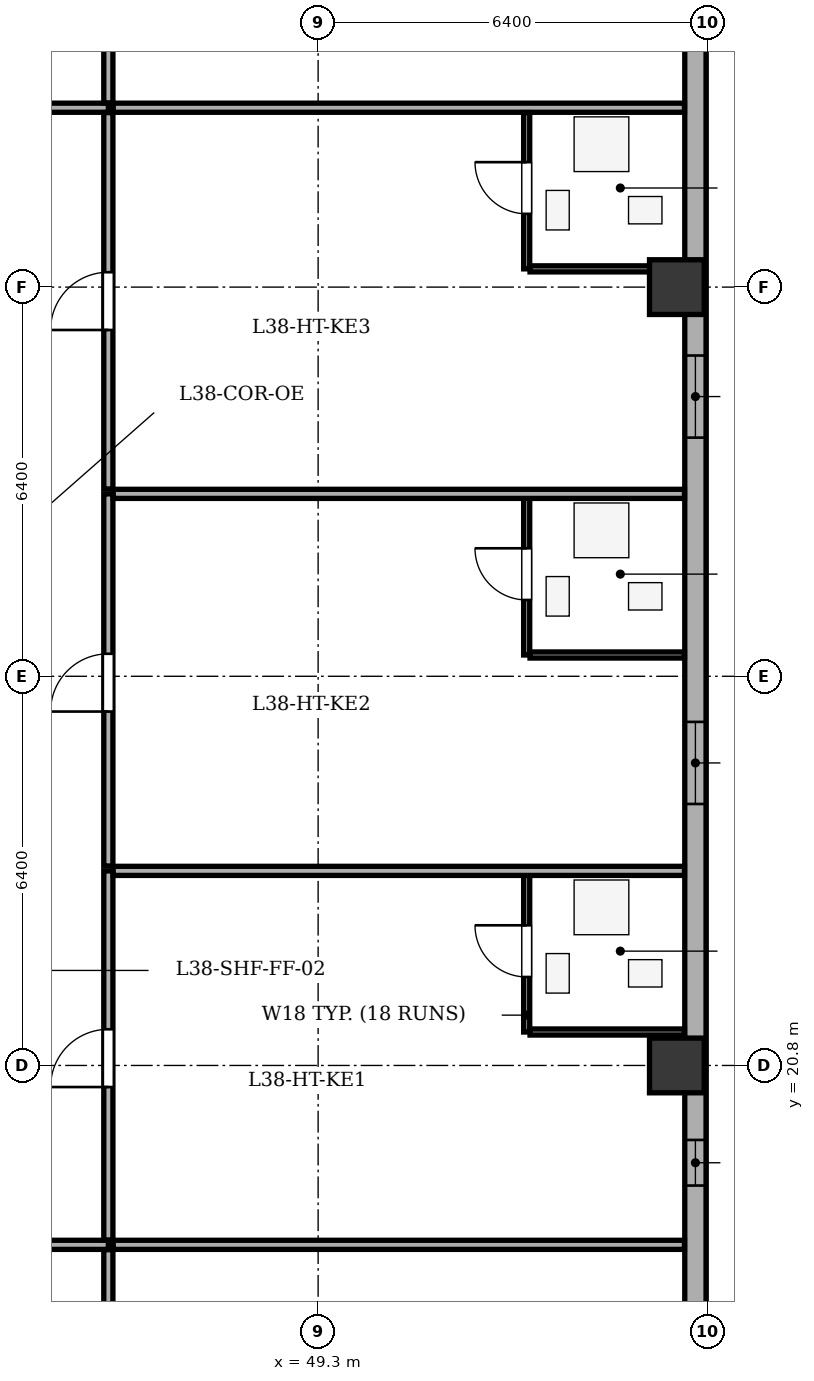
"""IFC4 building model, lengths in metres.
Left out: names, types, materials, properties, quantities, classifications, styles, units other than length and angle.
Written with IfcOpenShell. Run it as: python <this file> out.ifc"""

import sys

from ifc_helpers import new_model, si_unit, direction, frame, frame_2d, origin, origin_2d, place, context, subcontext, project, spatial, rectangle, extrude, element, fill, save


model = new_model("IFC4")
c1 = context("Model", 3, precision=1e-05, world=origin(), true_north=direction((0.0, 1.0)))
c2 = subcontext(c1, "Body", "Model", "MODEL_VIEW")
j1 = project(units=[si_unit("LENGTHUNIT", "METRE"), si_unit("PLANEANGLEUNIT", "RADIAN")], contexts=[c1])
p1 = place(None, origin())
s1 = spatial("IfcSite", under=j1, at=p1, CompositionType="ELEMENT")
p2 = place(p1, origin())
s2 = spatial("IfcBuilding", under=s1, at=p2, CompositionType="ELEMENT")
p3 = place(p2, frame((0.0, 0.0, 151.8)))
s3 = spatial("IfcBuildingStorey", under=s2, at=p3, CompositionType="ELEMENT", Elevation=151.8)
for number, where, z_axis, x_axis in (
    (1, (55.2, 20.8, 0.0), (0.0, 0.0, 1.0), (1.0, 0.0, 0.0)),
    (2, (55.2, 33.6, 0.0), (0.0, 0.0, 1.0), (1.0, 0.0, 0.0)),
):
    element("IfcColumn", number, at=place(p3, frame(where, z_axis=z_axis, x_axis=x_axis)), inside=s3, PredefinedType="COLUMN", context=c2, shape_type="SweptSolid", body=[
        extrude(rectangle(XDim=0.9, YDim=0.9, at=origin_2d()), origin(), (0.0, 0.0, 1.0), 3.5),
    ])
p4 = place(p3, frame((55.505, 41.5, 0.0), z_axis=(0.0, 0.0, 1.0), x_axis=(0.0, -1.0, 0.0)))
e3 = element("IfcWall", 3, at=p4, inside=s3, PredefinedType="STANDARD", context=c2, shape_type="SweptSolid", body=[
    extrude(rectangle(XDim=35.0, YDim=0.35, at=frame_2d((17.5, 0.0))), origin(), (0.0, 0.0, 1.0), 2.785),
])
p5 = place(p4, frame((1.813, 0.0, 0.75)))
e4 = element("IfcOpeningElement", 4, at=p5, cuts=e3, PredefinedType="OPENING", context=c2, shape_type="SweptSolid", body=[
    extrude(rectangle(XDim=1.6, YDim=1.75, at=frame_2d((0.8, 0.875))), frame((0.0, 0.185, 0.0), z_axis=(0.0, -1.0, 0.0), x_axis=(1.0, 0.0, 0.0)), (0.0, 0.0, 1.0), 0.37),
])
p6 = place(p4, frame((9.025, 0.0, 0.75)))
e5 = element("IfcOpeningElement", 5, at=p6, cuts=e3, PredefinedType="OPENING", context=c2, shape_type="SweptSolid", body=[
    extrude(rectangle(XDim=1.35, YDim=1.75, at=frame_2d((0.675, 0.875))), frame((0.0, 0.185, 0.0), z_axis=(0.0, -1.0, 0.0), x_axis=(1.0, 0.0, 0.0)), (0.0, 0.0, 1.0), 0.37),
])
p7 = place(p4, frame((15.05, 0.0, 0.75)))
e6 = element("IfcOpeningElement", 6, at=p7, cuts=e3, PredefinedType="OPENING", context=c2, shape_type="SweptSolid", body=[
    extrude(rectangle(XDim=1.35, YDim=1.75, at=frame_2d((0.675, 0.875))), frame((0.0, 0.185, 0.0), z_axis=(0.0, -1.0, 0.0), x_axis=(1.0, 0.0, 0.0)), (0.0, 0.0, 1.0), 0.37),
])
p8 = place(p4, frame((25.97, 0.0, 0.75)))
e7 = element("IfcOpeningElement", 7, at=p8, cuts=e3, PredefinedType="OPENING", context=c2, shape_type="SweptSolid", body=[
    extrude(rectangle(XDim=1.6, YDim=1.75, at=frame_2d((0.8, 0.875))), frame((0.0, 0.185, 0.0), z_axis=(0.0, -1.0, 0.0), x_axis=(1.0, 0.0, 0.0)), (0.0, 0.0, 1.0), 0.37),
])
p9 = place(p4, frame((30.555, 0.0, 0.75)))
e8 = element("IfcOpeningElement", 8, at=p9, cuts=e3, PredefinedType="OPENING", context=c2, shape_type="SweptSolid", body=[
    extrude(rectangle(XDim=2.1, YDim=1.75, at=frame_2d((1.05, 0.875))), frame((0.0, 0.185, 0.0), z_axis=(0.0, -1.0, 0.0), x_axis=(1.0, 0.0, 0.0)), (0.0, 0.0, 1.0), 0.37),
])
p10 = place(p4, frame((21.925, 0.0, 0.75)))
e9 = element("IfcOpeningElement", 9, at=p10, cuts=e3, PredefinedType="OPENING", context=c2, shape_type="SweptSolid", body=[
    extrude(rectangle(XDim=0.75, YDim=1.45, at=frame_2d((0.375, 0.725))), frame((0.0, 0.185, 0.0), z_axis=(0.0, -1.0, 0.0), x_axis=(1.0, 0.0, 0.0)), (0.0, 0.0, 1.0), 0.37),
])
p11 = place(p3, frame((42.073, 17.85, 0.0), z_axis=(0.0, 0.0, 1.0), x_axis=(1.0, 0.0, 0.0)))
e10 = element("IfcWall", 10, at=p11, inside=s3, PredefinedType="PARTITIONING", context=c2, shape_type="SweptSolid", body=[
    extrude(rectangle(XDim=3.777, YDim=0.15, at=frame_2d((1.889, 0.0))), origin(), (0.0, 0.0, 1.0), 3.2),
])
p12 = place(p11, frame((1.409, 0.0, 0.0)))
e11 = element("IfcOpeningElement", 11, at=p12, cuts=e10, PredefinedType="OPENING", context=c2, shape_type="SweptSolid", body=[
    extrude(rectangle(XDim=0.95, YDim=2.1, at=frame_2d((0.475, 1.05))), frame((0.0, 0.085, 0.0), z_axis=(0.0, -1.0, 0.0), x_axis=(1.0, 0.0, 0.0)), (0.0, 0.0, 1.0), 0.17),
])
p13 = place(p3, frame((45.85, 1.875, 0.0), z_axis=(0.0, 0.0, 1.0), x_axis=(0.0, 1.0, 0.0)))
e12 = element("IfcWall", 12, at=p13, inside=s3, PredefinedType="PARTITIONING", context=c2, shape_type="SweptSolid", body=[
    extrude(rectangle(XDim=15.895, YDim=0.15, at=frame_2d((7.948, 0.0))), origin(), (0.0, 0.0, 1.0), 3.2),
])
p14 = place(p3, frame((32.664, 36.55, 0.0), z_axis=(0.0, 0.0, 1.0), x_axis=(1.0, 0.0, 0.0)))
e13 = element("IfcWall", 13, at=p14, inside=s3, PredefinedType="PARTITIONING", context=c2, shape_type="SweptSolid", body=[
    extrude(rectangle(XDim=13.186, YDim=0.15, at=frame_2d((6.593, 0.0))), origin(), (0.0, 0.0, 1.0), 3.2),
])
p15 = place(p14, frame((6.033, 0.0, 0.0)))
e14 = element("IfcOpeningElement", 14, at=p15, cuts=e13, PredefinedType="OPENING", context=c2, shape_type="SweptSolid", body=[
    extrude(rectangle(XDim=1.0, YDim=2.1, at=frame_2d((0.5, 1.05))), frame((0.0, 0.085, 0.0), z_axis=(0.0, -1.0, 0.0), x_axis=(1.0, 0.0, 0.0)), (0.0, 0.0, 1.0), 0.17),
])
p16 = place(p3, frame((45.85, 36.63, 0.0), z_axis=(0.0, 0.0, 1.0), x_axis=(0.0, 1.0, 0.0)))
e15 = element("IfcWall", 15, at=p16, inside=s3, PredefinedType="PARTITIONING", context=c2, shape_type="SweptSolid", body=[
    extrude(rectangle(XDim=9.495, YDim=0.15, at=frame_2d((4.748, 0.0))), origin(), (0.0, 0.0, 1.0), 3.2),
])
for number, where, z_axis, x_axis in (
    (16, (45.93, 17.85, 0.0), (0.0, 0.0, 1.0), (1.0, 0.0, 0.0)),
    (17, (45.93, 36.55, 0.0), (0.0, 0.0, 1.0), (1.0, 0.0, 0.0)),
):
    element("IfcWall", number, at=place(p3, frame(where, z_axis=z_axis, x_axis=x_axis)), inside=s3, PredefinedType="PARTITIONING", context=c2, shape_type="SweptSolid", body=[
        extrude(rectangle(XDim=9.395, YDim=0.15, at=frame_2d((4.698, 0.0))), origin(), (0.0, 0.0, 1.0), 3.2),
    ])
p17 = place(p3, frame((45.85, 17.93, 0.0), z_axis=(0.0, 0.0, 1.0), x_axis=(0.0, 1.0, 0.0)))
e18 = element("IfcWall", 18, at=p17, inside=s3, PredefinedType="PARTITIONING", context=c2, shape_type="SweptSolid", body=[
    extrude(rectangle(XDim=6.07, YDim=0.15, at=frame_2d((3.035, 0.0))), origin(), (0.0, 0.0, 1.0), 3.2),
])
p18 = place(p17, frame((2.515, 0.0, 0.0)))
e19 = element("IfcOpeningElement", 19, at=p18, cuts=e18, PredefinedType="OPENING", context=c2, shape_type="SweptSolid", body=[
    extrude(rectangle(XDim=0.95, YDim=2.1, at=frame_2d((0.475, 1.05))), frame((0.0, 0.085, 0.0), z_axis=(0.0, -1.0, 0.0), x_axis=(1.0, 0.0, 0.0)), (0.0, 0.0, 1.0), 0.17),
])
p19 = place(p3, frame((52.73, 21.35, 0.0), z_axis=(0.0, 0.0, 1.0), x_axis=(0.0, 1.0, 0.0)))
e20 = element("IfcWall", 20, at=p19, inside=s3, PredefinedType="PARTITIONING", context=c2, shape_type="SweptSolid", body=[
    extrude(rectangle(XDim=2.65, YDim=0.1, at=frame_2d((1.325, 0.0))), origin(), (0.0, 0.0, 1.0), 3.2),
])
p20 = place(p19, frame((0.905, 0.0, 0.0)))
e21 = element("IfcOpeningElement", 21, at=p20, cuts=e20, PredefinedType="OPENING", context=c2, shape_type="SweptSolid", body=[
    extrude(rectangle(XDim=0.85, YDim=2.05, at=frame_2d((0.425, 1.025))), frame((0.0, 0.06, 0.0), z_axis=(0.0, -1.0, 0.0), x_axis=(1.0, 0.0, 0.0)), (0.0, 0.0, 1.0), 0.12),
])
p21 = place(p3, frame((52.785, 21.35, 0.0), z_axis=(0.0, 0.0, 1.0), x_axis=(1.0, 0.0, 0.0)))
e22 = element("IfcWall", 22, at=p21, inside=s3, PredefinedType="PARTITIONING", context=c2, shape_type="SweptSolid", body=[
    extrude(rectangle(XDim=2.54, YDim=0.1, at=frame_2d((1.27, 0.0))), origin(), (0.0, 0.0, 1.0), 3.2),
])
p22 = place(p3, frame((45.93, 24.0, 0.0), z_axis=(0.0, 0.0, 1.0), x_axis=(1.0, 0.0, 0.0)))
e23 = element("IfcWall", 23, at=p22, inside=s3, PredefinedType="PARTITIONING", context=c2, shape_type="SweptSolid", body=[
    extrude(rectangle(XDim=9.395, YDim=0.15, at=frame_2d((4.698, 0.0))), origin(), (0.0, 0.0, 1.0), 3.2),
])
p23 = place(p3, frame((45.85, 24.08, 0.0), z_axis=(0.0, 0.0, 1.0), x_axis=(0.0, 1.0, 0.0)))
e24 = element("IfcWall", 24, at=p23, inside=s3, PredefinedType="PARTITIONING", context=c2, shape_type="SweptSolid", body=[
    extrude(rectangle(XDim=6.12, YDim=0.15, at=frame_2d((3.06, 0.0))), origin(), (0.0, 0.0, 1.0), 3.2),
])
p24 = place(p23, frame((2.54, 0.0, 0.0)))
e25 = element("IfcOpeningElement", 25, at=p24, cuts=e24, PredefinedType="OPENING", context=c2, shape_type="SweptSolid", body=[
    extrude(rectangle(XDim=0.95, YDim=2.1, at=frame_2d((0.475, 1.05))), frame((0.0, 0.085, 0.0), z_axis=(0.0, -1.0, 0.0), x_axis=(1.0, 0.0, 0.0)), (0.0, 0.0, 1.0), 0.17),
])
p25 = place(p3, frame((52.73, 27.55, 0.0), z_axis=(0.0, 0.0, 1.0), x_axis=(0.0, 1.0, 0.0)))
e26 = element("IfcWall", 26, at=p25, inside=s3, PredefinedType="PARTITIONING", context=c2, shape_type="SweptSolid", body=[
    extrude(rectangle(XDim=2.65, YDim=0.1, at=frame_2d((1.325, 0.0))), origin(), (0.0, 0.0, 1.0), 3.2),
])
p26 = place(p25, frame((0.905, 0.0, 0.0)))
e27 = element("IfcOpeningElement", 27, at=p26, cuts=e26, PredefinedType="OPENING", context=c2, shape_type="SweptSolid", body=[
    extrude(rectangle(XDim=0.85, YDim=2.05, at=frame_2d((0.425, 1.025))), frame((0.0, 0.06, 0.0), z_axis=(0.0, -1.0, 0.0), x_axis=(1.0, 0.0, 0.0)), (0.0, 0.0, 1.0), 0.12),
])
p27 = place(p3, frame((52.785, 27.55, 0.0), z_axis=(0.0, 0.0, 1.0), x_axis=(1.0, 0.0, 0.0)))
e28 = element("IfcWall", 28, at=p27, inside=s3, PredefinedType="PARTITIONING", context=c2, shape_type="SweptSolid", body=[
    extrude(rectangle(XDim=2.54, YDim=0.1, at=frame_2d((1.27, 0.0))), origin(), (0.0, 0.0, 1.0), 3.2),
])
p28 = place(p3, frame((45.93, 30.2, 0.0), z_axis=(0.0, 0.0, 1.0), x_axis=(1.0, 0.0, 0.0)))
e29 = element("IfcWall", 29, at=p28, inside=s3, PredefinedType="PARTITIONING", context=c2, shape_type="SweptSolid", body=[
    extrude(rectangle(XDim=9.395, YDim=0.15, at=frame_2d((4.698, 0.0))), origin(), (0.0, 0.0, 1.0), 3.2),
])
p29 = place(p3, frame((45.85, 30.28, 0.0), z_axis=(0.0, 0.0, 1.0), x_axis=(0.0, 1.0, 0.0)))
e30 = element("IfcWall", 30, at=p29, inside=s3, PredefinedType="PARTITIONING", context=c2, shape_type="SweptSolid", body=[
    extrude(rectangle(XDim=6.19, YDim=0.15, at=frame_2d((3.095, 0.0))), origin(), (0.0, 0.0, 1.0), 3.2),
])
p30 = place(p29, frame((2.615, 0.0, 0.0)))
e31 = element("IfcOpeningElement", 31, at=p30, cuts=e30, PredefinedType="OPENING", context=c2, shape_type="SweptSolid", body=[
    extrude(rectangle(XDim=0.95, YDim=2.1, at=frame_2d((0.475, 1.05))), frame((0.0, 0.085, 0.0), z_axis=(0.0, -1.0, 0.0), x_axis=(1.0, 0.0, 0.0)), (0.0, 0.0, 1.0), 0.17),
])
p31 = place(p3, frame((52.73, 33.9, 0.0), z_axis=(0.0, 0.0, 1.0), x_axis=(0.0, 1.0, 0.0)))
e32 = element("IfcWall", 32, at=p31, inside=s3, PredefinedType="PARTITIONING", context=c2, shape_type="SweptSolid", body=[
    extrude(rectangle(XDim=2.57, YDim=0.1, at=frame_2d((1.285, 0.0))), origin(), (0.0, 0.0, 1.0), 3.2),
])
p32 = place(p31, frame((0.905, 0.0, 0.0)))
e33 = element("IfcOpeningElement", 33, at=p32, cuts=e32, PredefinedType="OPENING", context=c2, shape_type="SweptSolid", body=[
    extrude(rectangle(XDim=0.85, YDim=2.05, at=frame_2d((0.425, 1.025))), frame((0.0, 0.06, 0.0), z_axis=(0.0, -1.0, 0.0), x_axis=(1.0, 0.0, 0.0)), (0.0, 0.0, 1.0), 0.12),
])
p33 = place(p3, frame((52.785, 33.9, 0.0), z_axis=(0.0, 0.0, 1.0), x_axis=(1.0, 0.0, 0.0)))
e34 = element("IfcWall", 34, at=p33, inside=s3, PredefinedType="PARTITIONING", context=c2, shape_type="SweptSolid", body=[
    extrude(rectangle(XDim=2.54, YDim=0.1, at=frame_2d((1.27, 0.0))), origin(), (0.0, 0.0, 1.0), 2.535),
])
p34 = place(p6, origin())
e35 = element("IfcWindow", 35, at=p34, inside=s3, PartitioningType="SINGLE_PANEL", PredefinedType="WINDOW", context=c2, shape_type="SweptSolid", body=[
    extrude(rectangle(XDim=1.35, YDim=1.75, at=frame_2d((0.675, 0.875))), frame((0.0, -0.01, 0.0), z_axis=(0.0, -1.0, 0.0), x_axis=(1.0, 0.0, 0.0)), (0.0, 0.0, 1.0), 0.06),
])
fill(e5, e35)
p35 = place(p7, origin())
e36 = element("IfcWindow", 36, at=p35, inside=s3, PartitioningType="SINGLE_PANEL", PredefinedType="WINDOW", context=c2, shape_type="SweptSolid", body=[
    extrude(rectangle(XDim=1.35, YDim=1.75, at=frame_2d((0.675, 0.875))), frame((0.0, -0.01, 0.0), z_axis=(0.0, -1.0, 0.0), x_axis=(1.0, 0.0, 0.0)), (0.0, 0.0, 1.0), 0.06),
])
fill(e6, e36)
p36 = place(p10, origin())
e37 = element("IfcWindow", 37, at=p36, inside=s3, PartitioningType="SINGLE_PANEL", PredefinedType="WINDOW", context=c2, shape_type="SweptSolid", body=[
    extrude(rectangle(XDim=0.75, YDim=1.45, at=frame_2d((0.375, 0.725))), frame((0.0, -0.01, 0.0), z_axis=(0.0, -1.0, 0.0), x_axis=(1.0, 0.0, 0.0)), (0.0, 0.0, 1.0), 0.06),
])
fill(e9, e37)
p37 = place(p20, origin())
e38 = element("IfcDoor", 38, at=p37, inside=s3, OperationType="SINGLE_SWING_RIGHT", PredefinedType="DOOR", context=c2, shape_type="SweptSolid", body=[
    extrude(rectangle(XDim=0.85, YDim=2.05, at=frame_2d((0.425, 1.025))), frame((0.0, 0.025, 0.0), z_axis=(0.0, -1.0, 0.0), x_axis=(1.0, 0.0, 0.0)), (0.0, 0.0, 1.0), 0.05),
])
fill(e21, e38)
p38 = place(p18, origin())
e39 = element("IfcDoor", 39, at=p38, inside=s3, OperationType="SINGLE_SWING_LEFT", PredefinedType="DOOR", context=c2, shape_type="SweptSolid", body=[
    extrude(rectangle(XDim=0.95, YDim=2.1, at=frame_2d((0.475, 1.05))), frame((0.0, 0.025, 0.0), z_axis=(0.0, -1.0, 0.0), x_axis=(1.0, 0.0, 0.0)), (0.0, 0.0, 1.0), 0.05),
])
fill(e19, e39)
p39 = place(p26, origin())
e40 = element("IfcDoor", 40, at=p39, inside=s3, OperationType="SINGLE_SWING_RIGHT", PredefinedType="DOOR", context=c2, shape_type="SweptSolid", body=[
    extrude(rectangle(XDim=0.85, YDim=2.05, at=frame_2d((0.425, 1.025))), frame((0.0, 0.025, 0.0), z_axis=(0.0, -1.0, 0.0), x_axis=(1.0, 0.0, 0.0)), (0.0, 0.0, 1.0), 0.05),
])
fill(e27, e40)
p40 = place(p24, origin())
e41 = element("IfcDoor", 41, at=p40, inside=s3, OperationType="SINGLE_SWING_LEFT", PredefinedType="DOOR", context=c2, shape_type="SweptSolid", body=[
    extrude(rectangle(XDim=0.95, YDim=2.1, at=frame_2d((0.475, 1.05))), frame((0.0, 0.025, 0.0), z_axis=(0.0, -1.0, 0.0), x_axis=(1.0, 0.0, 0.0)), (0.0, 0.0, 1.0), 0.05),
])
fill(e25, e41)
p41 = place(p32, origin())
e42 = element("IfcDoor", 42, at=p41, inside=s3, OperationType="SINGLE_SWING_RIGHT", PredefinedType="DOOR", context=c2, shape_type="SweptSolid", body=[
    extrude(rectangle(XDim=0.85, YDim=2.05, at=frame_2d((0.425, 1.025))), frame((0.0, 0.025, 0.0), z_axis=(0.0, -1.0, 0.0), x_axis=(1.0, 0.0, 0.0)), (0.0, 0.0, 1.0), 0.05),
])
fill(e33, e42)
p42 = place(p30, origin())
e43 = element("IfcDoor", 43, at=p42, inside=s3, OperationType="SINGLE_SWING_LEFT", PredefinedType="DOOR", context=c2, shape_type="SweptSolid", body=[
    extrude(rectangle(XDim=0.95, YDim=2.1, at=frame_2d((0.475, 1.05))), frame((0.0, 0.025, 0.0), z_axis=(0.0, -1.0, 0.0), x_axis=(1.0, 0.0, 0.0)), (0.0, 0.0, 1.0), 0.05),
])
fill(e31, e43)
save(model, sys.argv[1])
